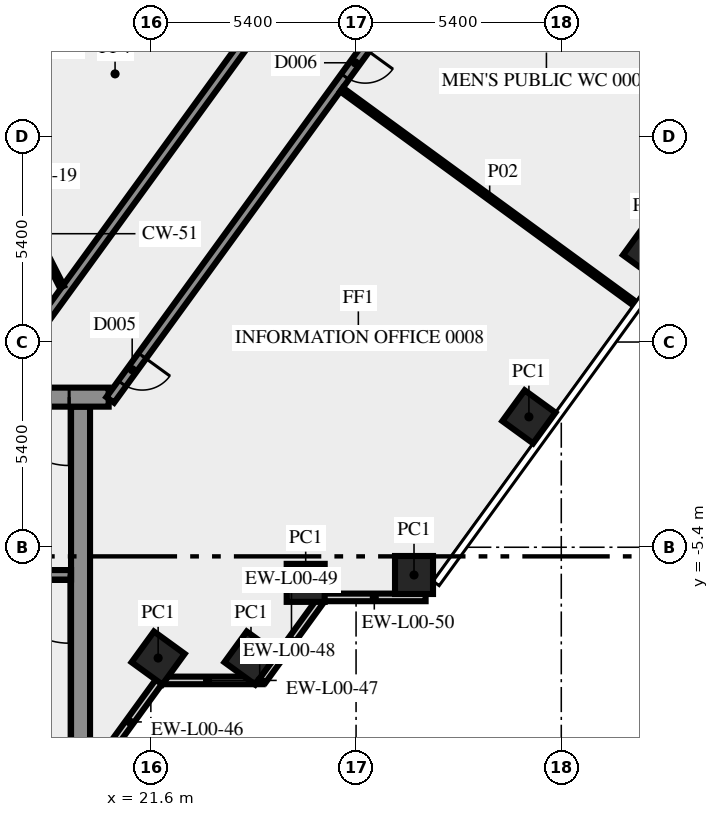
"""IFC4 building model, lengths in metres.
Left out: names, types, materials, properties, quantities, classifications, styles, units other than length and angle.
Written with IfcOpenShell. Run it as: python <this file> out.ifc"""

import sys

from ifc_helpers import new_model, si_unit, direction, frame, frame_2d, origin, origin_2d, place, context, subcontext, project, spatial, rectangle, extrude, element, fill, save


model = new_model("IFC4")
c1 = context("Model", 3, precision=1e-05, world=origin(), true_north=direction((0.0, 1.0)))
c2 = subcontext(c1, "Body", "Model", "MODEL_VIEW")
j1 = project(units=[si_unit("LENGTHUNIT", "METRE"), si_unit("PLANEANGLEUNIT", "RADIAN")], contexts=[c1])
p1 = place(None, origin())
s1 = spatial("IfcSite", under=j1, at=p1, CompositionType="ELEMENT")
p2 = place(p1, origin())
s2 = spatial("IfcBuilding", under=s1, at=p2, CompositionType="ELEMENT")
p3 = place(p2, origin())
s3 = spatial("IfcBuildingStorey", under=s2, at=p3, CompositionType="ELEMENT", Elevation=0.0)
for number, where, z_axis, x_axis in (
    (1, (21.792, -8.315, 0.0), (0.0, 0.0, 1.0), (0.588, 0.809, 0.0)),
    (2, (24.235, -8.315, 0.0), (0.0, 0.0, 1.0), (0.588, 0.809, 0.0)),
    (3, (25.674, -6.337, 0.0), (0.0, 0.0, 1.0), (1.0, 0.0, 0.0)),
    (4, (28.525, -6.13, 0.0), (0.0, 0.0, 1.0), (1.0, 0.0, 0.0)),
    (5, (31.548, -1.969, 0.0), (0.0, 0.0, 1.0), (0.588, 0.809, 0.0)),
    (6, (34.722, 2.4, 0.0), (0.0, 0.0, 1.0), (0.588, 0.809, 0.0)),
):
    element("IfcColumn", number, at=place(p3, frame(where, z_axis=z_axis, x_axis=x_axis)), inside=s3, PredefinedType="COLUMN", context=c2, shape_type="SweptSolid", body=[
        extrude(rectangle(XDim=1.0, YDim=1.0, at=origin_2d()), origin(), (0.0, 0.0, 1.0), 5.6),
    ])
p4 = place(p3, frame((20.253, -11.083, 0.0), z_axis=(0.0, 0.0, 1.0), x_axis=(0.587766567315, 0.809030569476, 0.0)))
e7 = element("IfcWall", 7, at=p4, inside=s3, PredefinedType="SOLIDWALL", context=c2, shape_type="SweptSolid", body=[
    extrude(rectangle(XDim=2.688, YDim=0.2, at=frame_2d((1.344, 0.0))), origin(), (0.0, 0.0, 1.0), 5.6),
])
p5 = place(p3, frame((21.943, -8.904, 0.0), z_axis=(0.0, 0.0, 1.0), x_axis=(1.0, 0.0, 0.0)))
e8 = element("IfcWall", 8, at=p5, inside=s3, PredefinedType="SOLIDWALL", context=c2, shape_type="SweptSolid", body=[
    extrude(rectangle(XDim=2.298, YDim=0.2, at=frame_2d((1.149, 0.0))), origin(), (0.0, 0.0, 1.0), 5.6),
])
p6 = place(p3, frame((24.387, -8.904, 0.0), z_axis=(0.0, 0.0, 1.0), x_axis=(1.0, 0.0, 0.0)))
e9 = element("IfcWall", 9, at=p6, inside=s3, PredefinedType="SOLIDWALL", context=c2, shape_type="SweptSolid", body=[
    extrude(rectangle(XDim=0.156, YDim=0.2, at=frame_2d((0.078, 0.0))), origin(), (0.0, 0.0, 1.0), 5.6),
])
p7 = place(p3, frame((24.54, -8.899, 0.0), z_axis=(0.0, 0.0, 1.0), x_axis=(0.587700286833, 0.809078718578, 0.0)))
e10 = element("IfcWall", 10, at=p7, inside=s3, PredefinedType="SOLIDWALL", context=c2, shape_type="SweptSolid", body=[
    extrude(rectangle(XDim=2.587, YDim=0.2, at=frame_2d((1.293, 0.0))), origin(), (0.0, 0.0, 1.0), 5.6),
])
p8 = place(p3, frame((26.13, -6.719, 0.0), z_axis=(0.0, 0.0, 1.0), x_axis=(1.0, 0.0, 0.0)))
e11 = element("IfcWall", 11, at=p8, inside=s3, PredefinedType="SOLIDWALL", context=c2, shape_type="SweptSolid", body=[
    extrude(rectangle(XDim=2.7, YDim=0.2, at=frame_2d((1.35, 0.0))), origin(), (0.0, 0.0, 1.0), 5.6),
])
p9 = place(p3, frame((19.75, -11.0, 0.0), z_axis=(0.0, 0.0, 1.0), x_axis=(0.0, 1.0, 0.0)))
e12 = element("IfcWall", 12, at=p9, inside=s3, PredefinedType="SHEAR", context=c2, shape_type="SweptSolid", body=[
    extrude(rectangle(XDim=9.3, YDim=0.5, at=frame_2d((4.65, 0.0))), origin(), (0.0, 0.0, 1.0), 5.6),
])
p10 = place(p3, frame((19.5, -6.125, 0.0), z_axis=(0.0, 0.0, 1.0), x_axis=(-1.0, 0.0, 0.0)))
e13 = element("IfcWall", 13, at=p10, inside=s3, PredefinedType="SHEAR", context=c2, shape_type="SweptSolid", body=[
    extrude(rectangle(XDim=8.05, YDim=0.25, at=frame_2d((4.025, 0.0))), origin(), (0.0, 0.0, 1.0), 5.6),
])
p11 = place(p10, frame((0.05, 0.0, 0.0)))
e14 = element("IfcOpeningElement", 14, at=p11, cuts=e13, PredefinedType="OPENING", context=c2, shape_type="SweptSolid", body=[
    extrude(rectangle(XDim=1.8, YDim=2.1, at=frame_2d((0.9, 1.05))), frame((0.0, 0.135, 0.0), z_axis=(0.0, -1.0, 0.0), x_axis=(1.0, 0.0, 0.0)), (0.0, 0.0, 1.0), 0.27),
])
p12 = place(p3, frame((20.49, -1.45, 0.0), z_axis=(0.0, 0.0, 1.0), x_axis=(-1.0, 0.0, 0.0)))
e15 = element("IfcWall", 15, at=p12, inside=s3, PredefinedType="SHEAR", context=c2, shape_type="SweptSolid", body=[
    extrude(rectangle(XDim=40.98, YDim=0.5, at=frame_2d((20.49, 0.0))), origin(), (0.0, 0.0, 1.0), 5.6),
])
p13 = place(p12, frame((38.14, 0.0, 0.0)))
e16 = element("IfcOpeningElement", 16, at=p13, cuts=e15, PredefinedType="OPENING", context=c2, shape_type="SweptSolid", body=[
    extrude(rectangle(XDim=1.8, YDim=2.1, at=frame_2d((0.9, 1.05))), frame((0.0, 0.26, 0.0), z_axis=(0.0, -1.0, 0.0), x_axis=(1.0, 0.0, 0.0)), (0.0, 0.0, 1.0), 0.52),
])
p14 = place(p12, frame((35.89, 0.0, 0.0)))
e17 = element("IfcOpeningElement", 17, at=p14, cuts=e15, PredefinedType="OPENING", context=c2, shape_type="SweptSolid", body=[
    extrude(rectangle(XDim=0.9, YDim=2.1, at=frame_2d((0.45, 1.05))), frame((0.0, 0.26, 0.0), z_axis=(0.0, -1.0, 0.0), x_axis=(1.0, 0.0, 0.0)), (0.0, 0.0, 1.0), 0.52),
])
p15 = place(p12, frame((32.94, 0.0, 0.0)))
e18 = element("IfcOpeningElement", 18, at=p15, cuts=e15, PredefinedType="OPENING", context=c2, shape_type="SweptSolid", body=[
    extrude(rectangle(XDim=0.9, YDim=2.1, at=frame_2d((0.45, 1.05))), frame((0.0, 0.26, 0.0), z_axis=(0.0, -1.0, 0.0), x_axis=(1.0, 0.0, 0.0)), (0.0, 0.0, 1.0), 0.52),
])
p16 = place(p12, frame((21.765, 0.0, 0.0)))
e19 = element("IfcOpeningElement", 19, at=p16, cuts=e15, PredefinedType="OPENING", context=c2, shape_type="SweptSolid", body=[
    extrude(rectangle(XDim=2.0, YDim=2.1, at=frame_2d((1.0, 1.05))), frame((0.0, 0.26, 0.0), z_axis=(0.0, -1.0, 0.0), x_axis=(1.0, 0.0, 0.0)), (0.0, 0.0, 1.0), 0.52),
])
p17 = place(p12, frame((7.14, 0.0, 0.0)))
e20 = element("IfcOpeningElement", 20, at=p17, cuts=e15, PredefinedType="OPENING", context=c2, shape_type="SweptSolid", body=[
    extrude(rectangle(XDim=0.9, YDim=2.1, at=frame_2d((0.45, 1.05))), frame((0.0, 0.26, 0.0), z_axis=(0.0, -1.0, 0.0), x_axis=(1.0, 0.0, 0.0)), (0.0, 0.0, 1.0), 0.52),
])
p18 = place(p12, frame((5.028, 0.0, 0.0)))
e21 = element("IfcOpeningElement", 21, at=p18, cuts=e15, PredefinedType="OPENING", context=c2, shape_type="SweptSolid", body=[
    extrude(rectangle(XDim=0.8, YDim=2.1, at=frame_2d((0.4, 1.05))), frame((0.0, 0.26, 0.0), z_axis=(0.0, -1.0, 0.0), x_axis=(1.0, 0.0, 0.0)), (0.0, 0.0, 1.0), 0.52),
])
p19 = place(p12, frame((3.452, 0.0, 0.0)))
e22 = element("IfcOpeningElement", 22, at=p19, cuts=e15, PredefinedType="OPENING", context=c2, shape_type="SweptSolid", body=[
    extrude(rectangle(XDim=0.8, YDim=2.1, at=frame_2d((0.4, 1.05))), frame((0.0, 0.26, 0.0), z_axis=(0.0, -1.0, 0.0), x_axis=(1.0, 0.0, 0.0)), (0.0, 0.0, 1.0), 0.52),
])
p20 = place(p12, frame((1.04, 0.0, 0.0)))
e23 = element("IfcOpeningElement", 23, at=p20, cuts=e15, PredefinedType="OPENING", context=c2, shape_type="SweptSolid", body=[
    extrude(rectangle(XDim=1.8, YDim=2.1, at=frame_2d((0.9, 1.05))), frame((0.0, 0.26, 0.0), z_axis=(0.0, -1.0, 0.0), x_axis=(1.0, 0.0, 0.0)), (0.0, 0.0, 1.0), 0.52),
])
p21 = place(p3, frame((49.869, 38.856, 0.0), z_axis=(0.0, 0.0, 1.0), x_axis=(-0.587784522481, -0.809017524614, 0.0)))
e24 = element("IfcWall", 24, at=p21, inside=s3, PredefinedType="SOLIDWALL", context=c2, shape_type="SweptSolid", body=[
    extrude(rectangle(XDim=49.912, YDim=0.25, at=frame_2d((24.956, 0.0))), origin(), (0.0, 0.0, 1.0), 5.6),
])
p22 = place(p21, frame((38.497, 0.0, 0.0)))
e25 = element("IfcOpeningElement", 25, at=p22, cuts=e24, PredefinedType="OPENING", context=c2, shape_type="SweptSolid", body=[
    extrude(rectangle(XDim=0.9, YDim=2.1, at=frame_2d((0.45, 1.05))), frame((0.0, 0.135, 0.0), z_axis=(0.0, -1.0, 0.0), x_axis=(1.0, 0.0, 0.0)), (0.0, 0.0, 1.0), 0.27),
])
p23 = place(p21, frame((0.442, 0.0, 0.0)))
e26 = element("IfcOpeningElement", 26, at=p23, cuts=e24, PredefinedType="OPENING", context=c2, shape_type="SweptSolid", body=[
    extrude(rectangle(XDim=0.9, YDim=2.1, at=frame_2d((0.45, 1.05))), frame((0.0, 0.135, 0.0), z_axis=(0.0, -1.0, 0.0), x_axis=(1.0, 0.0, 0.0)), (0.0, 0.0, 1.0), 0.27),
])
p24 = place(p21, frame((23.322, 0.0, 0.0)))
e27 = element("IfcOpeningElement", 27, at=p24, cuts=e24, PredefinedType="OPENING", context=c2, shape_type="SweptSolid", body=[
    extrude(rectangle(XDim=1.8, YDim=2.1, at=frame_2d((0.9, 1.05))), frame((0.0, 0.135, 0.0), z_axis=(0.0, -1.0, 0.0), x_axis=(1.0, 0.0, 0.0)), (0.0, 0.0, 1.0), 0.27),
])
p25 = place(p21, frame((48.479, 0.0, 0.0)))
e28 = element("IfcOpeningElement", 28, at=p25, cuts=e24, PredefinedType="OPENING", context=c2, shape_type="SweptSolid", body=[
    extrude(rectangle(XDim=0.9, YDim=2.1, at=frame_2d((0.45, 1.05))), frame((0.0, 0.135, 0.0), z_axis=(0.0, -1.0, 0.0), x_axis=(1.0, 0.0, 0.0)), (0.0, 0.0, 1.0), 0.27),
])
p26 = place(p3, frame((17.545, -1.125, 0.0), z_axis=(0.0, 0.0, 1.0), x_axis=(0.587786323093, 0.809016216391, 0.0)))
e29 = element("IfcWall", 29, at=p26, inside=s3, PredefinedType="SOLIDWALL", context=c2, shape_type="SweptSolid", body=[
    extrude(rectangle(XDim=33.493, YDim=0.25, at=frame_2d((16.747, 0.0))), origin(), (0.0, 0.0, 1.0), 5.6),
])
p27 = place(p26, frame((22.583, 0.0, 0.0)))
e30 = element("IfcOpeningElement", 30, at=p27, cuts=e29, PredefinedType="OPENING", context=c2, shape_type="SweptSolid", body=[
    extrude(rectangle(XDim=1.8, YDim=2.1, at=frame_2d((0.9, 1.05))), frame((0.0, 0.135, 0.0), z_axis=(0.0, -1.0, 0.0), x_axis=(1.0, 0.0, 0.0)), (0.0, 0.0, 1.0), 0.27),
])
p28 = place(p26, frame((14.807, 0.0, 0.0)))
e31 = element("IfcOpeningElement", 31, at=p28, cuts=e29, PredefinedType="OPENING", context=c2, shape_type="SweptSolid", body=[
    extrude(rectangle(XDim=0.9, YDim=2.1, at=frame_2d((0.45, 1.05))), frame((0.0, 0.135, 0.0), z_axis=(0.0, -1.0, 0.0), x_axis=(1.0, 0.0, 0.0)), (0.0, 0.0, 1.0), 0.27),
])
p29 = place(p26, frame((32.253, 0.0, 0.0)))
e32 = element("IfcOpeningElement", 32, at=p29, cuts=e29, PredefinedType="OPENING", context=c2, shape_type="SweptSolid", body=[
    extrude(rectangle(XDim=0.9, YDim=2.1, at=frame_2d((0.45, 1.05))), frame((0.0, 0.135, 0.0), z_axis=(0.0, -1.0, 0.0), x_axis=(1.0, 0.0, 0.0)), (0.0, 0.0, 1.0), 0.27),
])
p30 = place(p3, frame((37.399, 7.105, 0.0), z_axis=(0.0, 0.0, 1.0), x_axis=(-0.808992136407, 0.587819464829, 0.0)))
e33 = element("IfcWall", 33, at=p30, inside=s3, PredefinedType="PARTITIONING", context=c2, shape_type="SweptSolid", body=[
    extrude(rectangle(XDim=8.45, YDim=0.12, at=frame_2d((4.225, 0.0))), origin(), (0.0, 0.0, 1.0), 5.6),
])
p31 = place(p3, frame((26.619, 6.643, 0.0), z_axis=(0.0, 0.0, 1.0), x_axis=(0.807593618158, -0.589739389824, 0.0)))
e34 = element("IfcWall", 34, at=p31, inside=s3, PredefinedType="PARTITIONING", context=c2, shape_type="SweptSolid", body=[
    extrude(rectangle(XDim=9.651, YDim=0.12, at=frame_2d((4.826, 0.0))), origin(), (0.0, 0.0, 1.0), 4.6),
])
p32 = place(p3, frame((18.0, 3.925, 0.0), z_axis=(0.0, 0.0, 1.0), x_axis=(0.453950796792, -0.891026752736, 0.0)))
e35 = element("IfcWall", 35, at=p32, inside=s3, PredefinedType="PARTITIONING", context=c2, shape_type="SweptSolid", body=[
    extrude(rectangle(XDim=2.778, YDim=0.12, at=frame_2d((1.389, 0.0))), origin(), (0.0, 0.0, 1.0), 5.6),
])
p33 = place(p11, origin())
e36 = element("IfcDoor", 36, at=p33, inside=s3, OperationType="DOUBLE_DOOR_SINGLE_SWING", PredefinedType="DOOR", context=c2, shape_type="SweptSolid", body=[
    extrude(rectangle(XDim=1.8, YDim=2.1, at=frame_2d((0.9, 1.05))), frame((0.0, 0.025, 0.0), z_axis=(0.0, -1.0, 0.0), x_axis=(1.0, 0.0, 0.0)), (0.0, 0.0, 1.0), 0.05),
])
fill(e14, e36)
p34 = place(p20, origin())
e37 = element("IfcDoor", 37, at=p34, inside=s3, OperationType="DOUBLE_DOOR_SINGLE_SWING", PredefinedType="DOOR", context=c2, shape_type="SweptSolid", body=[
    extrude(rectangle(XDim=1.8, YDim=2.1, at=frame_2d((0.9, 1.05))), frame((0.0, 0.025, 0.0), z_axis=(0.0, -1.0, 0.0), x_axis=(1.0, 0.0, 0.0)), (0.0, 0.0, 1.0), 0.05),
])
fill(e23, e37)
p35 = place(p22, origin())
e38 = element("IfcDoor", 38, at=p35, inside=s3, OperationType="SINGLE_SWING_RIGHT", PredefinedType="DOOR", context=c2, shape_type="SweptSolid", body=[
    extrude(rectangle(XDim=0.9, YDim=2.1, at=frame_2d((0.45, 1.05))), frame((0.0, 0.025, 0.0), z_axis=(0.0, -1.0, 0.0), x_axis=(1.0, 0.0, 0.0)), (0.0, 0.0, 1.0), 0.05),
])
fill(e25, e38)
p36 = place(p25, origin())
e39 = element("IfcDoor", 39, at=p36, inside=s3, OperationType="SINGLE_SWING_RIGHT", PredefinedType="DOOR", context=c2, shape_type="SweptSolid", body=[
    extrude(rectangle(XDim=0.9, YDim=2.1, at=frame_2d((0.45, 1.05))), frame((0.0, 0.025, 0.0), z_axis=(0.0, -1.0, 0.0), x_axis=(1.0, 0.0, 0.0)), (0.0, 0.0, 1.0), 0.05),
])
fill(e28, e39)
save(model, sys.argv[1])
